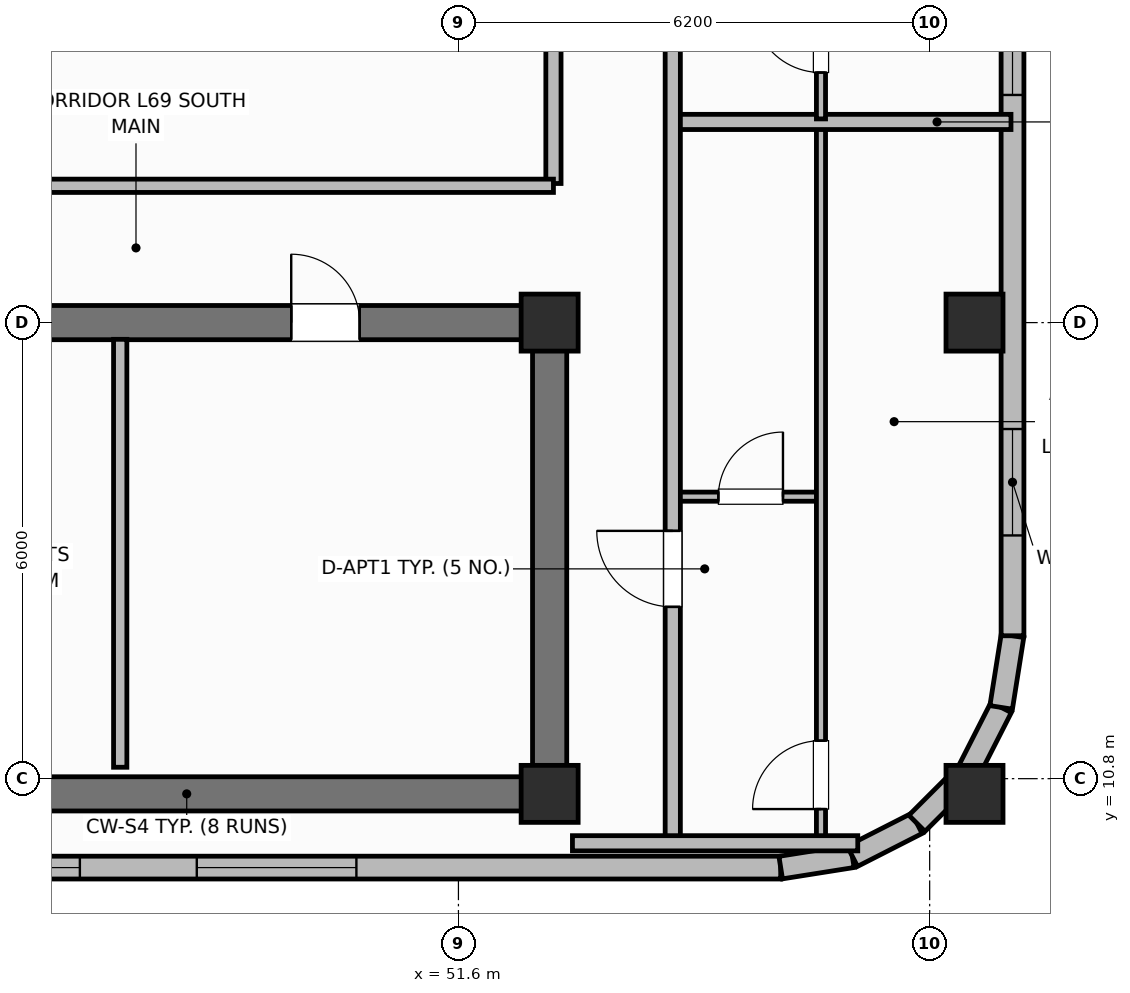
"""IFC4 building model, lengths in metres.
Left out: names, types, materials, properties, quantities, classifications, styles, units other than length and angle.
Written with IfcOpenShell. Run it as: python <this file> out.ifc"""

import sys

from ifc_helpers import new_model, si_unit, direction, frame, frame_2d, origin, origin_2d, place, context, subcontext, project, spatial, rectangle, extrude, element, fill, save


model = new_model("IFC4")
c1 = context("Model", 3, precision=1e-05, world=origin(), true_north=direction((0.0, 1.0)))
c2 = subcontext(c1, "Body", "Model", "MODEL_VIEW")
j1 = project(units=[si_unit("LENGTHUNIT", "METRE"), si_unit("PLANEANGLEUNIT", "RADIAN")], contexts=[c1])
p1 = place(None, origin())
s1 = spatial("IfcSite", under=j1, at=p1, CompositionType="ELEMENT")
p2 = place(p1, origin())
s2 = spatial("IfcBuilding", under=s1, at=p2, CompositionType="ELEMENT")
p3 = place(p2, frame((0.0, 0.0, 275.0)))
s3 = spatial("IfcBuildingStorey", under=s2, at=p3, CompositionType="ELEMENT", Elevation=275.0)
p4 = place(p3, frame((52.8, 10.6, 0.0), z_axis=(0.0, 0.0, 1.0), x_axis=(-1.0, 0.0, 0.0)))
e1 = element("IfcWall", 1, at=p4, inside=s3, PredefinedType="SHEAR", context=c2, shape_type="SweptSolid", body=[
    extrude(rectangle(XDim=27.2, YDim=0.45, at=frame_2d((13.6, 0.0))), origin(), (0.0, 0.0, 1.0), 3.7),
])
p5 = place(p3, frame((52.8, 10.825, 0.0), z_axis=(0.0, 0.0, 1.0), x_axis=(0.0, 1.0, 0.0)))
e2 = element("IfcWall", 2, at=p5, inside=s3, PredefinedType="SHEAR", context=c2, shape_type="SweptSolid", body=[
    extrude(rectangle(XDim=5.75, YDim=0.45, at=frame_2d((2.875, 0.0))), origin(), (0.0, 0.0, 1.0), 3.7),
])
p6 = place(p3, frame((25.6, 16.8, 0.0), z_axis=(0.0, 0.0, 1.0), x_axis=(1.0, 0.0, 0.0)))
e3 = element("IfcWall", 3, at=p6, inside=s3, PredefinedType="SHEAR", context=c2, shape_type="SweptSolid", body=[
    extrude(rectangle(XDim=27.2, YDim=0.45, at=frame_2d((13.6, 0.0))), origin(), (0.0, 0.0, 1.0), 3.7),
])
p7 = place(p6, frame((1.8, 0.0, 0.0)))
e4 = element("IfcOpeningElement", 4, at=p7, cuts=e3, PredefinedType="OPENING", context=c2, shape_type="SweptSolid", body=[
    extrude(rectangle(XDim=1.1, YDim=2.15, at=frame_2d((0.55, 1.075))), frame((0.0, 0.235, 0.0), z_axis=(0.0, -1.0, 0.0), x_axis=(1.0, 0.0, 0.0)), (0.0, 0.0, 1.0), 0.47),
])
p8 = place(p6, frame((5.6, 0.0, 0.0)))
e5 = element("IfcOpeningElement", 5, at=p8, cuts=e3, PredefinedType="OPENING", context=c2, shape_type="SweptSolid", body=[
    extrude(rectangle(XDim=0.85, YDim=2.1, at=frame_2d((0.425, 1.05))), frame((0.0, 0.235, 0.0), z_axis=(0.0, -1.0, 0.0), x_axis=(1.0, 0.0, 0.0)), (0.0, 0.0, 1.0), 0.47),
])
p9 = place(p6, frame((13.0, 0.0, 0.0)))
e6 = element("IfcOpeningElement", 6, at=p9, cuts=e3, PredefinedType="OPENING", context=c2, shape_type="SweptSolid", body=[
    extrude(rectangle(XDim=1.2, YDim=2.15, at=frame_2d((0.6, 1.075))), frame((0.0, 0.235, 0.0), z_axis=(0.0, -1.0, 0.0), x_axis=(1.0, 0.0, 0.0)), (0.0, 0.0, 1.0), 0.47),
])
p10 = place(p6, frame((19.2, 0.0, 0.0)))
e7 = element("IfcOpeningElement", 7, at=p10, cuts=e3, PredefinedType="OPENING", context=c2, shape_type="SweptSolid", body=[
    extrude(rectangle(XDim=0.85, YDim=2.1, at=frame_2d((0.425, 1.05))), frame((0.0, 0.235, 0.0), z_axis=(0.0, -1.0, 0.0), x_axis=(1.0, 0.0, 0.0)), (0.0, 0.0, 1.0), 0.47),
])
p11 = place(p6, frame((23.8, 0.0, 0.0)))
e8 = element("IfcOpeningElement", 8, at=p11, cuts=e3, PredefinedType="OPENING", context=c2, shape_type="SweptSolid", body=[
    extrude(rectangle(XDim=0.9, YDim=2.1, at=frame_2d((0.45, 1.05))), frame((0.0, 0.235, 0.0), z_axis=(0.0, -1.0, 0.0), x_axis=(1.0, 0.0, 0.0)), (0.0, 0.0, 1.0), 0.47),
])
for number, where, z_axis, x_axis in (
    (9, (52.8, 10.6, 0.0), (0.0, 0.0, 1.0), (1.0, 0.0, 0.0)),
    (10, (52.8, 16.8, 0.0), (0.0, 0.0, 1.0), (1.0, 0.0, 0.0)),
    (11, (58.39, 10.6, 0.0), (0.0, 0.0, 1.0), (1.0, 0.0, 0.0)),
    (12, (58.39, 16.8, 0.0), (0.0, 0.0, 1.0), (1.0, 0.0, 0.0)),
):
    element("IfcColumn", number, at=place(p3, frame(where, z_axis=z_axis, x_axis=x_axis)), inside=s3, PredefinedType="COLUMN", context=c2, shape_type="SweptSolid", body=[
        extrude(rectangle(XDim=0.75, YDim=0.75, at=origin_2d()), origin(), (0.0, 0.0, 1.0), 3.7),
    ])
p12 = place(p3, frame((30.61, 9.63, 0.0), z_axis=(0.0, 0.0, 1.0), x_axis=(1.0, 0.0, 0.0)))
e13 = element("IfcWall", 13, at=p12, inside=s3, PredefinedType="SOLIDWALL", context=c2, shape_type="SweptSolid", body=[
    extrude(rectangle(XDim=25.23, YDim=0.3, at=frame_2d((12.615, 0.0))), origin(), (0.0, 0.0, 1.0), 2.73),
])
p13 = place(p12, frame((0.894, 0.0, 0.71)))
e14 = element("IfcOpeningElement", 14, at=p13, cuts=e13, PredefinedType="OPENING", context=c2, shape_type="SweptSolid", body=[
    extrude(rectangle(XDim=2.1, YDim=1.9, at=frame_2d((1.05, 0.95))), frame((0.0, 0.16, 0.0), z_axis=(0.0, -1.0, 0.0), x_axis=(1.0, 0.0, 0.0)), (0.0, 0.0, 1.0), 0.32),
])
p14 = place(p12, frame((5.933, 0.0, 0.71)))
e15 = element("IfcOpeningElement", 15, at=p14, cuts=e13, PredefinedType="OPENING", context=c2, shape_type="SweptSolid", body=[
    extrude(rectangle(XDim=2.1, YDim=1.9, at=frame_2d((1.05, 0.95))), frame((0.0, 0.16, 0.0), z_axis=(0.0, -1.0, 0.0), x_axis=(1.0, 0.0, 0.0)), (0.0, 0.0, 1.0), 0.32),
])
p15 = place(p12, frame((9.221, 0.0, 0.71)))
e16 = element("IfcOpeningElement", 16, at=p15, cuts=e13, PredefinedType="OPENING", context=c2, shape_type="SweptSolid", body=[
    extrude(rectangle(XDim=2.1, YDim=1.9, at=frame_2d((1.05, 0.95))), frame((0.0, 0.16, 0.0), z_axis=(0.0, -1.0, 0.0), x_axis=(1.0, 0.0, 0.0)), (0.0, 0.0, 1.0), 0.32),
])
p16 = place(p12, frame((13.909, 0.0, 0.71)))
e17 = element("IfcOpeningElement", 17, at=p16, cuts=e13, PredefinedType="OPENING", context=c2, shape_type="SweptSolid", body=[
    extrude(rectangle(XDim=2.1, YDim=1.9, at=frame_2d((1.05, 0.95))), frame((0.0, 0.16, 0.0), z_axis=(0.0, -1.0, 0.0), x_axis=(1.0, 0.0, 0.0)), (0.0, 0.0, 1.0), 0.32),
])
p17 = place(p12, frame((17.548, 0.0, 0.71)))
e18 = element("IfcOpeningElement", 18, at=p17, cuts=e13, PredefinedType="OPENING", context=c2, shape_type="SweptSolid", body=[
    extrude(rectangle(XDim=2.1, YDim=1.9, at=frame_2d((1.05, 0.95))), frame((0.0, 0.16, 0.0), z_axis=(0.0, -1.0, 0.0), x_axis=(1.0, 0.0, 0.0)), (0.0, 0.0, 1.0), 0.32),
])
p18 = place(p3, frame((55.84, 9.63, 0.0), z_axis=(0.0, 0.0, 1.0), x_axis=(0.987663181641, 0.156593229835, 0.0)))
e19 = element("IfcWall", 19, at=p18, inside=s3, PredefinedType="SOLIDWALL", context=c2, shape_type="SweptSolid", body=[
    extrude(rectangle(XDim=0.954, YDim=0.3, at=frame_2d((0.477, 0.0))), origin(), (0.0, 0.0, 1.0), 2.73),
])
for number, where, z_axis, x_axis in (
    (20, (56.782, 9.779, 0.0), (0.0, 0.0, 1.0), (0.891, 0.454, 0.0)),
    (21, (57.633, 10.212, 0.0), (0.0, 0.0, 1.0), (0.707, 0.707, 0.0)),
    (22, (58.308, 10.887, 0.0), (0.0, 0.0, 1.0), (0.454, 0.891, 0.0)),
):
    element("IfcWall", number, at=place(p3, frame(where, z_axis=z_axis, x_axis=x_axis)), inside=s3, PredefinedType="SOLIDWALL", context=c2, shape_type="SweptSolid", body=[
        extrude(rectangle(XDim=0.954, YDim=0.3, at=frame_2d((0.477, 0.0))), origin(), (0.0, 0.0, 1.0), 2.73),
    ])
p19 = place(p3, frame((58.741, 11.738, 0.0), z_axis=(0.0, 0.0, 1.0), x_axis=(0.156343617883, 0.987702725088, 0.0)))
e23 = element("IfcWall", 23, at=p19, inside=s3, PredefinedType="SOLIDWALL", context=c2, shape_type="SweptSolid", body=[
    extrude(rectangle(XDim=0.954, YDim=0.3, at=frame_2d((0.477, 0.0))), origin(), (0.0, 0.0, 1.0), 2.73),
])
p20 = place(p3, frame((58.89, 12.68, 0.0), z_axis=(0.0, 0.0, 1.0), x_axis=(0.0, 1.0, 0.0)))
e24 = element("IfcWall", 24, at=p20, inside=s3, PredefinedType="SOLIDWALL", context=c2, shape_type="SweptSolid", body=[
    extrude(rectangle(XDim=11.12, YDim=0.3, at=frame_2d((5.56, 0.0))), origin(), (0.0, 0.0, 1.0), 2.73),
])
p21 = place(p20, frame((1.32, 0.0, 0.72)))
e25 = element("IfcOpeningElement", 25, at=p21, cuts=e24, PredefinedType="OPENING", context=c2, shape_type="SweptSolid", body=[
    extrude(rectangle(XDim=1.4, YDim=1.85, at=frame_2d((0.7, 0.925))), frame((0.0, 0.16, 0.0), z_axis=(0.0, -1.0, 0.0), x_axis=(1.0, 0.0, 0.0)), (0.0, 0.0, 1.0), 0.32),
])
p22 = place(p20, frame((7.115, 0.0, 0.76)))
e26 = element("IfcOpeningElement", 26, at=p22, cuts=e24, PredefinedType="OPENING", context=c2, shape_type="SweptSolid", body=[
    extrude(rectangle(XDim=1.8, YDim=1.85, at=frame_2d((0.9, 0.925))), frame((0.0, 0.16, 0.0), z_axis=(0.0, -1.0, 0.0), x_axis=(1.0, 0.0, 0.0)), (0.0, 0.0, 1.0), 0.32),
])
p23 = place(p3, frame((47.15, 10.95, 0.0), z_axis=(0.0, 0.0, 1.0), x_axis=(0.0, 1.0, 0.0)))
e27 = element("IfcWall", 27, at=p23, inside=s3, PredefinedType="PARTITIONING", context=c2, shape_type="SweptSolid", body=[
    extrude(rectangle(XDim=5.63, YDim=0.175, at=frame_2d((2.815, 0.0))), origin(), (0.0, 0.0, 1.0), 2.56),
])
p24 = place(p3, frame((52.85, 18.63, 0.0), z_axis=(0.0, 0.0, 1.0), x_axis=(0.0, 1.0, 0.0)))
e28 = element("IfcWall", 28, at=p24, inside=s3, PredefinedType="PARTITIONING", context=c2, shape_type="SweptSolid", body=[
    extrude(rectangle(XDim=19.14, YDim=0.2, at=frame_2d((9.57, 0.0))), origin(), (0.0, 0.0, 1.0), 2.56),
])
p25 = place(p3, frame((30.7, 18.6, 0.0), z_axis=(0.0, 0.0, 1.0), x_axis=(1.0, 0.0, 0.0)))
e29 = element("IfcWall", 29, at=p25, inside=s3, PredefinedType="PARTITIONING", context=c2, shape_type="SweptSolid", body=[
    extrude(rectangle(XDim=22.15, YDim=0.175, at=frame_2d((11.075, 0.0))), origin(), (0.0, 0.0, 1.0), 2.56),
])
p26 = place(p3, frame((54.42, 14.51, 0.0), z_axis=(0.0, 0.0, 1.0), x_axis=(1.0, 0.0, 0.0)))
e30 = element("IfcWall", 30, at=p26, inside=s3, PredefinedType="PARTITIONING", context=c2, shape_type="SweptSolid", body=[
    extrude(rectangle(XDim=1.95, YDim=0.12, at=frame_2d((0.975, 0.0))), origin(), (0.0, 0.0, 1.0), 2.56),
])
p27 = place(p26, frame((0.6, 0.0, 0.0)))
e31 = element("IfcOpeningElement", 31, at=p27, cuts=e30, PredefinedType="OPENING", context=c2, shape_type="SweptSolid", body=[
    extrude(rectangle(XDim=0.85, YDim=2.1, at=frame_2d((0.425, 1.05))), frame((0.0, 0.07, 0.0), z_axis=(0.0, -1.0, 0.0), x_axis=(1.0, 0.0, 0.0)), (0.0, 0.0, 1.0), 0.14),
])
p28 = place(p3, frame((56.37, 9.99, 0.0), z_axis=(0.0, 0.0, 1.0), x_axis=(0.0, 1.0, 0.0)))
e32 = element("IfcWall", 32, at=p28, inside=s3, PredefinedType="PARTITIONING", context=c2, shape_type="SweptSolid", body=[
    extrude(rectangle(XDim=9.41, YDim=0.12, at=frame_2d((4.705, 0.0))), origin(), (0.0, 0.0, 1.0), 2.56),
])
p29 = place(p28, frame((0.41, 0.0, 0.0)))
e33 = element("IfcOpeningElement", 33, at=p29, cuts=e32, PredefinedType="OPENING", context=c2, shape_type="SweptSolid", body=[
    extrude(rectangle(XDim=0.9, YDim=2.1, at=frame_2d((0.45, 1.05))), frame((0.0, 0.07, 0.0), z_axis=(0.0, -1.0, 0.0), x_axis=(1.0, 0.0, 0.0)), (0.0, 0.0, 1.0), 0.14),
])
p30 = place(p3, frame((54.42, 19.44, 0.0), z_axis=(0.0, 0.0, 1.0), x_axis=(1.0, 0.0, 0.0)))
e34 = element("IfcWall", 34, at=p30, inside=s3, PredefinedType="PARTITIONING", context=c2, shape_type="SweptSolid", body=[
    extrude(rectangle(XDim=4.45, YDim=0.2, at=frame_2d((2.225, 0.0))), origin(), (0.0, 0.0, 1.0), 2.56),
])
p31 = place(p3, frame((56.37, 19.48, 0.0), z_axis=(0.0, 0.0, 1.0), x_axis=(0.0, 1.0, 0.0)))
e35 = element("IfcWall", 35, at=p31, inside=s3, PredefinedType="PARTITIONING", context=c2, shape_type="SweptSolid", body=[
    extrude(rectangle(XDim=13.23, YDim=0.12, at=frame_2d((6.615, 0.0))), origin(), (0.0, 0.0, 1.0), 2.56),
])
p32 = place(p31, frame((0.61, 0.0, 0.0)))
e36 = element("IfcOpeningElement", 36, at=p32, cuts=e35, PredefinedType="OPENING", context=c2, shape_type="SweptSolid", body=[
    extrude(rectangle(XDim=0.9, YDim=2.1, at=frame_2d((0.45, 1.05))), frame((0.0, 0.07, 0.0), z_axis=(0.0, -1.0, 0.0), x_axis=(1.0, 0.0, 0.0)), (0.0, 0.0, 1.0), 0.14),
])
p33 = place(p31, frame((10.79, 0.0, 0.0)))
e37 = element("IfcOpeningElement", 37, at=p33, cuts=e35, PredefinedType="OPENING", context=c2, shape_type="SweptSolid", body=[
    extrude(rectangle(XDim=0.82, YDim=2.08, at=frame_2d((0.41, 1.04))), frame((0.0, 0.07, 0.0), z_axis=(0.0, -1.0, 0.0), x_axis=(1.0, 0.0, 0.0)), (0.0, 0.0, 1.0), 0.14),
])
p34 = place(p3, frame((54.42, 9.95, 0.0), z_axis=(0.0, 0.0, 1.0), x_axis=(0.0, 1.0, 0.0)))
e38 = element("IfcWall", 38, at=p34, inside=s3, PredefinedType="PARTITIONING", context=c2, shape_type="SweptSolid", body=[
    extrude(rectangle(XDim=36.5, YDim=0.2, at=frame_2d((18.25, 0.0))), origin(), (0.0, 0.0, 1.0), 2.56),
])
p35 = place(p34, frame((3.11, 0.0, 0.0)))
e39 = element("IfcOpeningElement", 39, at=p35, cuts=e38, PredefinedType="OPENING", context=c2, shape_type="SweptSolid", body=[
    extrude(rectangle(XDim=1.0, YDim=2.15, at=frame_2d((0.5, 1.075))), frame((0.0, 0.11, 0.0), z_axis=(0.0, -1.0, 0.0), x_axis=(1.0, 0.0, 0.0)), (0.0, 0.0, 1.0), 0.22),
])
p36 = place(p34, frame((11.99, 0.0, 0.0)))
e40 = element("IfcOpeningElement", 40, at=p36, cuts=e38, PredefinedType="OPENING", context=c2, shape_type="SweptSolid", body=[
    extrude(rectangle(XDim=1.0, YDim=2.15, at=frame_2d((0.5, 1.075))), frame((0.0, 0.11, 0.0), z_axis=(0.0, -1.0, 0.0), x_axis=(1.0, 0.0, 0.0)), (0.0, 0.0, 1.0), 0.22),
])
p37 = place(p34, frame((23.5, 0.0, 0.0)))
e41 = element("IfcOpeningElement", 41, at=p37, cuts=e38, PredefinedType="OPENING", context=c2, shape_type="SweptSolid", body=[
    extrude(rectangle(XDim=1.0, YDim=2.15, at=frame_2d((0.5, 1.075))), frame((0.0, 0.11, 0.0), z_axis=(0.0, -1.0, 0.0), x_axis=(1.0, 0.0, 0.0)), (0.0, 0.0, 1.0), 0.22),
])
p38 = place(p34, frame((31.2, 0.0, 0.0)))
e42 = element("IfcOpeningElement", 42, at=p38, cuts=e38, PredefinedType="OPENING", context=c2, shape_type="SweptSolid", body=[
    extrude(rectangle(XDim=1.0, YDim=2.15, at=frame_2d((0.5, 1.075))), frame((0.0, 0.11, 0.0), z_axis=(0.0, -1.0, 0.0), x_axis=(1.0, 0.0, 0.0)), (0.0, 0.0, 1.0), 0.22),
])
p39 = place(p3, frame((53.1, 9.95, 0.0), z_axis=(0.0, 0.0, 1.0), x_axis=(1.0, 0.0, 0.0)))
e43 = element("IfcWall", 43, at=p39, inside=s3, PredefinedType="PARTITIONING", context=c2, shape_type="SweptSolid", body=[
    extrude(rectangle(XDim=3.754, YDim=0.2, at=frame_2d((1.877, 0.0))), origin(), (0.0, 0.0, 1.0), 2.56),
])
p40 = place(p16, origin())
e44 = element("IfcWindow", 44, at=p40, inside=s3, PartitioningType="SINGLE_PANEL", PredefinedType="WINDOW", context=c2, shape_type="SweptSolid", body=[
    extrude(rectangle(XDim=2.1, YDim=1.9, at=frame_2d((1.05, 0.95))), frame((0.0, 0.03, 0.0), z_axis=(0.0, -1.0, 0.0), x_axis=(1.0, 0.0, 0.0)), (0.0, 0.0, 1.0), 0.06),
])
fill(e17, e44)
p41 = place(p17, origin())
e45 = element("IfcWindow", 45, at=p41, inside=s3, PartitioningType="SINGLE_PANEL", PredefinedType="WINDOW", context=c2, shape_type="SweptSolid", body=[
    extrude(rectangle(XDim=2.1, YDim=1.9, at=frame_2d((1.05, 0.95))), frame((0.0, 0.03, 0.0), z_axis=(0.0, -1.0, 0.0), x_axis=(1.0, 0.0, 0.0)), (0.0, 0.0, 1.0), 0.06),
])
fill(e18, e45)
p42 = place(p21, origin())
e46 = element("IfcWindow", 46, at=p42, inside=s3, PartitioningType="SINGLE_PANEL", PredefinedType="WINDOW", context=c2, shape_type="SweptSolid", body=[
    extrude(rectangle(XDim=1.4, YDim=1.85, at=frame_2d((0.7, 0.925))), frame((0.0, 0.03, 0.0), z_axis=(0.0, -1.0, 0.0), x_axis=(1.0, 0.0, 0.0)), (0.0, 0.0, 1.0), 0.06),
])
fill(e25, e46)
p43 = place(p22, origin())
e47 = element("IfcWindow", 47, at=p43, inside=s3, PartitioningType="SINGLE_PANEL", PredefinedType="WINDOW", context=c2, shape_type="SweptSolid", body=[
    extrude(rectangle(XDim=1.8, YDim=1.85, at=frame_2d((0.9, 0.925))), frame((0.0, 0.03, 0.0), z_axis=(0.0, -1.0, 0.0), x_axis=(1.0, 0.0, 0.0)), (0.0, 0.0, 1.0), 0.06),
])
fill(e26, e47)
p44 = place(p27, origin())
e48 = element("IfcDoor", 48, at=p44, inside=s3, OperationType="SINGLE_SWING_RIGHT", PredefinedType="DOOR", context=c2, shape_type="SweptSolid", body=[
    extrude(rectangle(XDim=0.85, YDim=2.1, at=frame_2d((0.425, 1.05))), frame((0.0, 0.025, 0.0), z_axis=(0.0, -1.0, 0.0), x_axis=(1.0, 0.0, 0.0)), (0.0, 0.0, 1.0), 0.05),
])
fill(e31, e48)
p45 = place(p29, origin())
e49 = element("IfcDoor", 49, at=p45, inside=s3, OperationType="SINGLE_SWING_LEFT", PredefinedType="DOOR", context=c2, shape_type="SweptSolid", body=[
    extrude(rectangle(XDim=0.9, YDim=2.1, at=frame_2d((0.45, 1.05))), frame((0.0, 0.025, 0.0), z_axis=(0.0, -1.0, 0.0), x_axis=(1.0, 0.0, 0.0)), (0.0, 0.0, 1.0), 0.05),
])
fill(e33, e49)
p46 = place(p32, origin())
e50 = element("IfcDoor", 50, at=p46, inside=s3, OperationType="SINGLE_SWING_RIGHT", PredefinedType="DOOR", context=c2, shape_type="SweptSolid", body=[
    extrude(rectangle(XDim=0.9, YDim=2.1, at=frame_2d((0.45, 1.05))), frame((0.0, 0.025, 0.0), z_axis=(0.0, -1.0, 0.0), x_axis=(1.0, 0.0, 0.0)), (0.0, 0.0, 1.0), 0.05),
])
fill(e36, e50)
p47 = place(p35, origin())
e51 = element("IfcDoor", 51, at=p47, inside=s3, OperationType="SINGLE_SWING_RIGHT", PredefinedType="DOOR", context=c2, shape_type="SweptSolid", body=[
    extrude(rectangle(XDim=1.0, YDim=2.15, at=frame_2d((0.5, 1.075))), frame((0.0, 0.025, 0.0), z_axis=(0.0, -1.0, 0.0), x_axis=(1.0, 0.0, 0.0)), (0.0, 0.0, 1.0), 0.05),
])
fill(e39, e51)
p48 = place(p11, origin())
e52 = element("IfcDoor", 52, at=p48, inside=s3, OperationType="SINGLE_SWING_LEFT", PredefinedType="DOOR", context=c2, shape_type="SweptSolid", body=[
    extrude(rectangle(XDim=0.9, YDim=2.1, at=frame_2d((0.45, 1.05))), frame((0.0, 0.025, 0.0), z_axis=(0.0, -1.0, 0.0), x_axis=(1.0, 0.0, 0.0)), (0.0, 0.0, 1.0), 0.05),
])
fill(e8, e52)
save(model, sys.argv[1])
